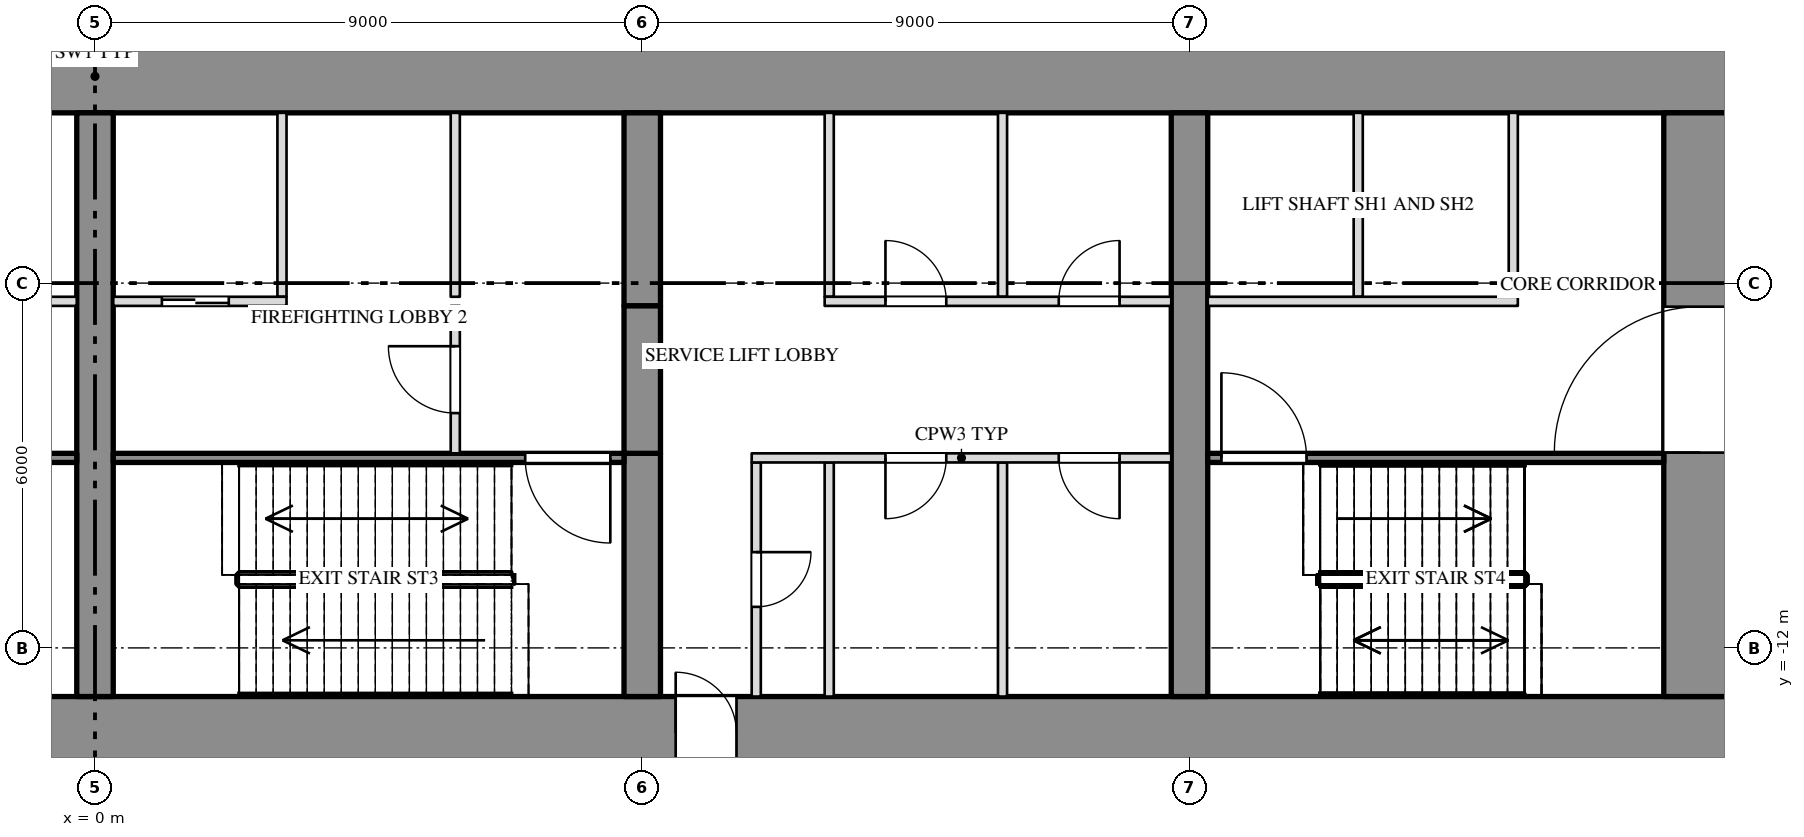
"""IFC4 building model, lengths in metres.
Left out: names, types, materials, properties, quantities, classifications, styles, units other than length and angle.
Written with IfcOpenShell. Run it as: python <this file> out.ifc"""

import sys

from ifc_helpers import new_model, si_unit, direction, frame, frame_2d, origin, place, context, subcontext, project, spatial, rectangle, extrude, element, fill, save


model = new_model("IFC4")
c1 = context("Model", 3, precision=1e-05, world=origin(), true_north=direction((0.0, 1.0)))
c2 = subcontext(c1, "Body", "Model", "MODEL_VIEW")
j1 = project(units=[si_unit("LENGTHUNIT", "METRE"), si_unit("PLANEANGLEUNIT", "RADIAN")], contexts=[c1])
p1 = place(None, origin())
s1 = spatial("IfcSite", under=j1, at=p1, CompositionType="ELEMENT")
p2 = place(p1, origin())
s2 = spatial("IfcBuilding", under=s1, at=p2, CompositionType="ELEMENT")
p3 = place(p2, frame((0.0, 0.0, 21.0)))
s3 = spatial("IfcBuildingStorey", under=s2, at=p3, CompositionType="ELEMENT", Elevation=21.0)
p4 = place(p3, frame((-27.0, -2.6, 0.0), z_axis=(0.0, 0.0, 1.0), x_axis=(1.0, 0.0, 0.0)))
e1 = element("IfcWall", 1, at=p4, inside=s3, PredefinedType="SHEAR", context=c2, shape_type="SweptSolid", body=[
    extrude(rectangle(XDim=54.0, YDim=1.2, at=frame_2d((27.0, 0.0))), origin(), (0.0, 0.0, 1.0), 5.7),
])
p5 = place(p3, frame((-27.0, -13.4, 0.0), z_axis=(0.0, 0.0, 1.0), x_axis=(1.0, 0.0, 0.0)))
e2 = element("IfcWall", 2, at=p5, inside=s3, PredefinedType="SHEAR", context=c2, shape_type="SweptSolid", body=[
    extrude(rectangle(XDim=54.0, YDim=1.2, at=frame_2d((27.0, 0.0))), origin(), (0.0, 0.0, 1.0), 5.7),
])
p6 = place(p5, frame((16.45, 0.0, 0.0)))
e3 = element("IfcOpeningElement", 3, at=p6, cuts=e2, PredefinedType="OPENING", context=c2, shape_type="SweptSolid", body=[
    extrude(rectangle(XDim=1.0, YDim=2.1, at=frame_2d((0.5, 1.05))), frame((0.0, 0.612, 0.0), z_axis=(0.0, -1.0, 0.0), x_axis=(1.0, 0.0, 0.0)), (0.0, 0.0, 1.0), 1.224),
])
p7 = place(p5, frame((36.55, 0.0, 0.0)))
e4 = element("IfcOpeningElement", 4, at=p7, cuts=e2, PredefinedType="OPENING", context=c2, shape_type="SweptSolid", body=[
    extrude(rectangle(XDim=1.0, YDim=2.1, at=frame_2d((0.5, 1.05))), frame((0.0, 0.612, 0.0), z_axis=(0.0, -1.0, 0.0), x_axis=(1.0, 0.0, 0.0)), (0.0, 0.0, 1.0), 1.224),
])
p8 = place(p3, frame((26.4, -12.8, 0.0), z_axis=(0.0, 0.0, 1.0), x_axis=(0.0, 1.0, 0.0)))
e5 = element("IfcWall", 5, at=p8, inside=s3, PredefinedType="SHEAR", context=c2, shape_type="SweptSolid", body=[
    extrude(rectangle(XDim=9.6, YDim=1.2, at=frame_2d((4.8, 0.0))), origin(), (0.0, 0.0, 1.0), 5.7),
])
p9 = place(p8, frame((4.012, 0.0, 0.0)))
e6 = element("IfcOpeningElement", 6, at=p9, cuts=e5, PredefinedType="OPENING", context=c2, shape_type="SweptSolid", body=[
    extrude(rectangle(XDim=2.4, YDim=2.1, at=frame_2d((1.2, 1.05))), frame((0.0, 0.612, 0.0), z_axis=(0.0, -1.0, 0.0), x_axis=(1.0, 0.0, 0.0)), (0.0, 0.0, 1.0), 1.224),
])
p10 = place(p3, frame((0.0, -12.8, 0.0), z_axis=(0.0, 0.0, 1.0), x_axis=(0.0, 1.0, 0.0)))
e7 = element("IfcWall", 7, at=p10, inside=s3, PredefinedType="SHEAR", context=c2, shape_type="SweptSolid", body=[
    extrude(rectangle(XDim=9.6, YDim=0.6, at=frame_2d((4.8, 0.0))), origin(), (0.0, 0.0, 1.0), 5.7),
])
p11 = place(p3, frame((9.0, -12.8, 0.0), z_axis=(0.0, 0.0, 1.0), x_axis=(0.0, 1.0, 0.0)))
e8 = element("IfcWall", 8, at=p11, inside=s3, PredefinedType="SHEAR", context=c2, shape_type="SweptSolid", body=[
    extrude(rectangle(XDim=4.0, YDim=0.6, at=frame_2d((2.0, 0.0))), origin(), (0.0, 0.0, 1.0), 5.7),
])
p12 = place(p3, frame((9.0, -6.375, 0.0), z_axis=(0.0, 0.0, 1.0), x_axis=(0.0, 1.0, 0.0)))
e9 = element("IfcWall", 9, at=p12, inside=s3, PredefinedType="SHEAR", context=c2, shape_type="SweptSolid", body=[
    extrude(rectangle(XDim=3.175, YDim=0.6, at=frame_2d((1.587, 0.0))), origin(), (0.0, 0.0, 1.0), 5.7),
])
p13 = place(p3, frame((9.0, -8.8, 3.6), z_axis=(0.0, 0.0, 1.0), x_axis=(0.0, 1.0, 0.0)))
e10 = element("IfcWall", 10, at=p13, inside=s3, PredefinedType="SHEAR", context=c2, shape_type="SweptSolid", body=[
    extrude(rectangle(XDim=2.425, YDim=0.6, at=frame_2d((1.212, 0.0))), origin(), (0.0, 0.0, 1.0), 2.1),
])
p14 = place(p3, frame((18.0, -12.8, 0.0), z_axis=(0.0, 0.0, 1.0), x_axis=(0.0, 1.0, 0.0)))
e11 = element("IfcWall", 11, at=p14, inside=s3, PredefinedType="SHEAR", context=c2, shape_type="SweptSolid", body=[
    extrude(rectangle(XDim=9.6, YDim=0.6, at=frame_2d((4.8, 0.0))), origin(), (0.0, 0.0, 1.0), 5.7),
])
for number, where, z_axis, x_axis in (
    (12, (3.075, -6.225, 0.0), (0.0, 0.0, 1.0), (0.0, 1.0, 0.0)),
    (13, (5.925, -6.225, 0.0), (0.0, 0.0, 1.0), (0.0, 1.0, 0.0)),
    (14, (12.075, -6.225, 0.0), (0.0, 0.0, 1.0), (0.0, 1.0, 0.0)),
    (15, (14.925, -6.225, 0.0), (0.0, 0.0, 1.0), (0.0, 1.0, 0.0)),
    (16, (20.775, -6.225, 0.0), (0.0, 0.0, 1.0), (0.0, 1.0, 0.0)),
    (17, (23.325, -6.225, 0.0), (0.0, 0.0, 1.0), (0.0, 1.0, 0.0)),
):
    element("IfcWall", number, at=place(p3, frame(where, z_axis=z_axis, x_axis=x_axis)), inside=s3, PredefinedType="PARTITIONING", context=c2, shape_type="SweptSolid", body=[
        extrude(rectangle(XDim=3.025, YDim=0.15, at=frame_2d((1.513, 0.0))), origin(), (0.0, 0.0, 1.0), 5.7),
    ])
p15 = place(p3, frame((10.875, -12.8, 0.0), z_axis=(0.0, 0.0, 1.0), x_axis=(0.0, 1.0, 0.0)))
e18 = element("IfcWall", 18, at=p15, inside=s3, PredefinedType="PARTITIONING", context=c2, shape_type="SweptSolid", body=[
    extrude(rectangle(XDim=3.85, YDim=0.15, at=frame_2d((1.925, 0.0))), origin(), (0.0, 0.0, 1.0), 5.7),
])
p16 = place(p15, frame((1.475, 0.0, 0.0)))
e19 = element("IfcOpeningElement", 19, at=p16, cuts=e18, PredefinedType="OPENING", context=c2, shape_type="SweptSolid", body=[
    extrude(rectangle(XDim=0.9, YDim=2.1, at=frame_2d((0.45, 1.05))), frame((0.0, 0.087, 0.0), z_axis=(0.0, -1.0, 0.0), x_axis=(1.0, 0.0, 0.0)), (0.0, 0.0, 1.0), 0.174),
])
for number, where, z_axis, x_axis in (
    (20, (12.075, -12.8, 0.0), (0.0, 0.0, 1.0), (0.0, 1.0, 0.0)),
    (21, (14.925, -12.8, 0.0), (0.0, 0.0, 1.0), (0.0, 1.0, 0.0)),
):
    element("IfcWall", number, at=place(p3, frame(where, z_axis=z_axis, x_axis=x_axis)), inside=s3, PredefinedType="PARTITIONING", context=c2, shape_type="SweptSolid", body=[
        extrude(rectangle(XDim=3.85, YDim=0.15, at=frame_2d((1.925, 0.0))), origin(), (0.0, 0.0, 1.0), 5.7),
    ])
p17 = place(p3, frame((5.925, -8.8, 0.0), z_axis=(0.0, 0.0, 1.0), x_axis=(0.0, 1.0, 0.0)))
e22 = element("IfcWall", 22, at=p17, inside=s3, PredefinedType="PARTITIONING", context=c2, shape_type="SweptSolid", body=[
    extrude(rectangle(XDim=2.425, YDim=0.15, at=frame_2d((1.212, 0.0))), origin(), (0.0, 0.0, 1.0), 5.7),
])
p18 = place(p17, frame((0.662, 0.0, 0.0)))
e23 = element("IfcOpeningElement", 23, at=p18, cuts=e22, PredefinedType="OPENING", context=c2, shape_type="SweptSolid", body=[
    extrude(rectangle(XDim=1.1, YDim=2.1, at=frame_2d((0.55, 1.05))), frame((0.0, 0.087, 0.0), z_axis=(0.0, -1.0, 0.0), x_axis=(1.0, 0.0, 0.0)), (0.0, 0.0, 1.0), 0.174),
])
p19 = place(p3, frame((-3.15, -6.3, 0.0), z_axis=(0.0, 0.0, 1.0), x_axis=(1.0, 0.0, 0.0)))
e24 = element("IfcWall", 24, at=p19, inside=s3, PredefinedType="PARTITIONING", context=c2, shape_type="SweptSolid", body=[
    extrude(rectangle(XDim=2.85, YDim=0.15, at=frame_2d((1.425, 0.0))), origin(), (0.0, 0.0, 1.0), 5.7),
])
p20 = place(p19, frame((0.95, 0.0, 0.0)))
e25 = element("IfcOpeningElement", 25, at=p20, cuts=e24, PredefinedType="OPENING", context=c2, shape_type="SweptSolid", body=[
    extrude(rectangle(XDim=1.1, YDim=2.1, at=frame_2d((0.55, 1.05))), frame((0.0, 0.087, 0.0), z_axis=(0.0, -1.0, 0.0), x_axis=(1.0, 0.0, 0.0)), (0.0, 0.0, 1.0), 0.174),
])
p21 = place(p3, frame((0.3, -6.3, 0.0), z_axis=(0.0, 0.0, 1.0), x_axis=(1.0, 0.0, 0.0)))
e26 = element("IfcWall", 26, at=p21, inside=s3, PredefinedType="PARTITIONING", context=c2, shape_type="SweptSolid", body=[
    extrude(rectangle(XDim=2.85, YDim=0.15, at=frame_2d((1.425, 0.0))), origin(), (0.0, 0.0, 1.0), 5.7),
])
p22 = place(p21, frame((0.8, 0.0, 0.0)))
e27 = element("IfcOpeningElement", 27, at=p22, cuts=e26, PredefinedType="OPENING", context=c2, shape_type="SweptSolid", body=[
    extrude(rectangle(XDim=1.1, YDim=2.1, at=frame_2d((0.55, 1.05))), frame((0.0, 0.087, 0.0), z_axis=(0.0, -1.0, 0.0), x_axis=(1.0, 0.0, 0.0)), (0.0, 0.0, 1.0), 0.174),
])
p23 = place(p3, frame((12.0, -6.3, 0.0), z_axis=(0.0, 0.0, 1.0), x_axis=(1.0, 0.0, 0.0)))
e28 = element("IfcWall", 28, at=p23, inside=s3, PredefinedType="PARTITIONING", context=c2, shape_type="SweptSolid", body=[
    extrude(rectangle(XDim=5.7, YDim=0.15, at=frame_2d((2.85, 0.0))), origin(), (0.0, 0.0, 1.0), 5.7),
])
p24 = place(p23, frame((1.0, 0.0, 0.0)))
e29 = element("IfcOpeningElement", 29, at=p24, cuts=e28, PredefinedType="OPENING", context=c2, shape_type="SweptSolid", body=[
    extrude(rectangle(XDim=1.0, YDim=2.1, at=frame_2d((0.5, 1.05))), frame((0.0, 0.087, 0.0), z_axis=(0.0, -1.0, 0.0), x_axis=(1.0, 0.0, 0.0)), (0.0, 0.0, 1.0), 0.174),
])
p25 = place(p23, frame((3.85, 0.0, 0.0)))
e30 = element("IfcOpeningElement", 30, at=p25, cuts=e28, PredefinedType="OPENING", context=c2, shape_type="SweptSolid", body=[
    extrude(rectangle(XDim=1.0, YDim=2.1, at=frame_2d((0.5, 1.05))), frame((0.0, 0.087, 0.0), z_axis=(0.0, -1.0, 0.0), x_axis=(1.0, 0.0, 0.0)), (0.0, 0.0, 1.0), 0.174),
])
p26 = place(p3, frame((18.3, -6.3, 0.0), z_axis=(0.0, 0.0, 1.0), x_axis=(1.0, 0.0, 0.0)))
e31 = element("IfcWall", 31, at=p26, inside=s3, PredefinedType="PARTITIONING", context=c2, shape_type="SweptSolid", body=[
    extrude(rectangle(XDim=5.1, YDim=0.15, at=frame_2d((2.55, 0.0))), origin(), (0.0, 0.0, 1.0), 5.7),
])
p27 = place(p3, frame((-8.7, -8.875, 0.0), z_axis=(0.0, 0.0, 1.0), x_axis=(1.0, 0.0, 0.0)))
e32 = element("IfcWall", 32, at=p27, inside=s3, PredefinedType="SHEAR", context=c2, shape_type="SweptSolid", body=[
    extrude(rectangle(XDim=8.4, YDim=0.15, at=frame_2d((4.2, 0.0))), origin(), (0.0, 0.0, 1.0), 5.7),
])
p28 = place(p27, frame((0.225, 0.0, 0.0)))
e33 = element("IfcOpeningElement", 33, at=p28, cuts=e32, PredefinedType="OPENING", context=c2, shape_type="SweptSolid", body=[
    extrude(rectangle(XDim=1.4, YDim=2.1, at=frame_2d((0.7, 1.05))), frame((0.0, 0.087, 0.0), z_axis=(0.0, -1.0, 0.0), x_axis=(1.0, 0.0, 0.0)), (0.0, 0.0, 1.0), 0.174),
])
p29 = place(p3, frame((0.3, -8.875, 0.0), z_axis=(0.0, 0.0, 1.0), x_axis=(1.0, 0.0, 0.0)))
e34 = element("IfcWall", 34, at=p29, inside=s3, PredefinedType="SHEAR", context=c2, shape_type="SweptSolid", body=[
    extrude(rectangle(XDim=8.4, YDim=0.15, at=frame_2d((4.2, 0.0))), origin(), (0.0, 0.0, 1.0), 5.7),
])
p30 = place(p29, frame((6.775, 0.0, 0.0)))
e35 = element("IfcOpeningElement", 35, at=p30, cuts=e34, PredefinedType="OPENING", context=c2, shape_type="SweptSolid", body=[
    extrude(rectangle(XDim=1.4, YDim=2.1, at=frame_2d((0.7, 1.05))), frame((0.0, 0.087, 0.0), z_axis=(0.0, -1.0, 0.0), x_axis=(1.0, 0.0, 0.0)), (0.0, 0.0, 1.0), 0.174),
])
p31 = place(p3, frame((10.8, -8.875, 0.0), z_axis=(0.0, 0.0, 1.0), x_axis=(1.0, 0.0, 0.0)))
e36 = element("IfcWall", 36, at=p31, inside=s3, PredefinedType="PARTITIONING", context=c2, shape_type="SweptSolid", body=[
    extrude(rectangle(XDim=6.9, YDim=0.15, at=frame_2d((3.45, 0.0))), origin(), (0.0, 0.0, 1.0), 5.7),
])
p32 = place(p31, frame((2.2, 0.0, 0.0)))
e37 = element("IfcOpeningElement", 37, at=p32, cuts=e36, PredefinedType="OPENING", context=c2, shape_type="SweptSolid", body=[
    extrude(rectangle(XDim=1.0, YDim=2.1, at=frame_2d((0.5, 1.05))), frame((0.0, 0.087, 0.0), z_axis=(0.0, -1.0, 0.0), x_axis=(1.0, 0.0, 0.0)), (0.0, 0.0, 1.0), 0.174),
])
p33 = place(p31, frame((5.05, 0.0, 0.0)))
e38 = element("IfcOpeningElement", 38, at=p33, cuts=e36, PredefinedType="OPENING", context=c2, shape_type="SweptSolid", body=[
    extrude(rectangle(XDim=1.0, YDim=2.1, at=frame_2d((0.5, 1.05))), frame((0.0, 0.087, 0.0), z_axis=(0.0, -1.0, 0.0), x_axis=(1.0, 0.0, 0.0)), (0.0, 0.0, 1.0), 0.174),
])
p34 = place(p3, frame((18.3, -8.875, 0.0), z_axis=(0.0, 0.0, 1.0), x_axis=(1.0, 0.0, 0.0)))
e39 = element("IfcWall", 39, at=p34, inside=s3, PredefinedType="SHEAR", context=c2, shape_type="SweptSolid", body=[
    extrude(rectangle(XDim=7.5, YDim=0.15, at=frame_2d((3.75, 0.0))), origin(), (0.0, 0.0, 1.0), 5.7),
])
p35 = place(p34, frame((0.225, 0.0, 0.0)))
e40 = element("IfcOpeningElement", 40, at=p35, cuts=e39, PredefinedType="OPENING", context=c2, shape_type="SweptSolid", body=[
    extrude(rectangle(XDim=1.4, YDim=2.1, at=frame_2d((0.7, 1.05))), frame((0.0, 0.087, 0.0), z_axis=(0.0, -1.0, 0.0), x_axis=(1.0, 0.0, 0.0)), (0.0, 0.0, 1.0), 0.174),
])
p36 = place(p22, origin())
e41 = element("IfcDoor", 41, at=p36, inside=s3, OperationType="SLIDING_TO_RIGHT", PredefinedType="DOOR", context=c2, shape_type="SweptSolid", body=[
    extrude(rectangle(XDim=1.1, YDim=2.1, at=frame_2d((0.55, 1.05))), frame((0.0, 0.025, 0.0), z_axis=(0.0, -1.0, 0.0), x_axis=(1.0, 0.0, 0.0)), (0.0, 0.0, 1.0), 0.05),
])
fill(e27, e41)
p37 = place(p18, origin())
e42 = element("IfcDoor", 42, at=p37, inside=s3, OperationType="SINGLE_SWING_RIGHT", PredefinedType="DOOR", context=c2, shape_type="SweptSolid", body=[
    extrude(rectangle(XDim=1.1, YDim=2.1, at=frame_2d((0.55, 1.05))), frame((0.0, 0.025, 0.0), z_axis=(0.0, -1.0, 0.0), x_axis=(1.0, 0.0, 0.0)), (0.0, 0.0, 1.0), 0.05),
])
fill(e23, e42)
p38 = place(p30, origin())
e43 = element("IfcDoor", 43, at=p38, inside=s3, OperationType="DOUBLE_DOOR_SINGLE_SWING", PredefinedType="DOOR", context=c2, shape_type="SweptSolid", body=[
    extrude(rectangle(XDim=1.4, YDim=2.1, at=frame_2d((0.7, 1.05))), frame((0.0, 0.025, 0.0), z_axis=(0.0, -1.0, 0.0), x_axis=(1.0, 0.0, 0.0)), (0.0, 0.0, 1.0), 0.05),
])
fill(e35, e43)
p39 = place(p7, origin())
e44 = element("IfcDoor", 44, at=p39, inside=s3, OperationType="SINGLE_SWING_LEFT", PredefinedType="DOOR", context=c2, shape_type="SweptSolid", body=[
    extrude(rectangle(XDim=1.0, YDim=2.1, at=frame_2d((0.5, 1.05))), frame((0.0, 0.025, 0.0), z_axis=(0.0, -1.0, 0.0), x_axis=(1.0, 0.0, 0.0)), (0.0, 0.0, 1.0), 0.05),
])
fill(e4, e44)
p40 = place(p16, origin())
e45 = element("IfcDoor", 45, at=p40, inside=s3, OperationType="SINGLE_SWING_LEFT", PredefinedType="DOOR", context=c2, shape_type="SweptSolid", body=[
    extrude(rectangle(XDim=0.9, YDim=2.1, at=frame_2d((0.45, 1.05))), frame((0.0, 0.025, 0.0), z_axis=(0.0, -1.0, 0.0), x_axis=(1.0, 0.0, 0.0)), (0.0, 0.0, 1.0), 0.05),
])
fill(e19, e45)
p41 = place(p32, origin())
e46 = element("IfcDoor", 46, at=p41, inside=s3, OperationType="SINGLE_SWING_RIGHT", PredefinedType="DOOR", context=c2, shape_type="SweptSolid", body=[
    extrude(rectangle(XDim=1.0, YDim=2.1, at=frame_2d((0.5, 1.05))), frame((0.0, 0.025, 0.0), z_axis=(0.0, -1.0, 0.0), x_axis=(1.0, 0.0, 0.0)), (0.0, 0.0, 1.0), 0.05),
])
fill(e37, e46)
p42 = place(p24, origin())
e47 = element("IfcDoor", 47, at=p42, inside=s3, OperationType="SINGLE_SWING_LEFT", PredefinedType="DOOR", context=c2, shape_type="SweptSolid", body=[
    extrude(rectangle(XDim=1.0, YDim=2.1, at=frame_2d((0.5, 1.05))), frame((0.0, 0.025, 0.0), z_axis=(0.0, -1.0, 0.0), x_axis=(1.0, 0.0, 0.0)), (0.0, 0.0, 1.0), 0.05),
])
fill(e29, e47)
p43 = place(p33, origin())
e48 = element("IfcDoor", 48, at=p43, inside=s3, OperationType="SINGLE_SWING_LEFT", PredefinedType="DOOR", context=c2, shape_type="SweptSolid", body=[
    extrude(rectangle(XDim=1.0, YDim=2.1, at=frame_2d((0.5, 1.05))), frame((0.0, 0.025, 0.0), z_axis=(0.0, -1.0, 0.0), x_axis=(1.0, 0.0, 0.0)), (0.0, 0.0, 1.0), 0.05),
])
fill(e38, e48)
p44 = place(p25, origin())
e49 = element("IfcDoor", 49, at=p44, inside=s3, OperationType="SINGLE_SWING_RIGHT", PredefinedType="DOOR", context=c2, shape_type="SweptSolid", body=[
    extrude(rectangle(XDim=1.0, YDim=2.1, at=frame_2d((0.5, 1.05))), frame((0.0, 0.025, 0.0), z_axis=(0.0, -1.0, 0.0), x_axis=(1.0, 0.0, 0.0)), (0.0, 0.0, 1.0), 0.05),
])
fill(e30, e49)
p45 = place(p35, origin())
e50 = element("IfcDoor", 50, at=p45, inside=s3, OperationType="DOUBLE_DOOR_SINGLE_SWING", PredefinedType="DOOR", context=c2, shape_type="SweptSolid", body=[
    extrude(rectangle(XDim=1.4, YDim=2.1, at=frame_2d((0.7, 1.05))), frame((0.0, 0.025, 0.0), z_axis=(0.0, -1.0, 0.0), x_axis=(1.0, 0.0, 0.0)), (0.0, 0.0, 1.0), 0.05),
])
fill(e40, e50)
p46 = place(p9, origin())
e51 = element("IfcDoor", 51, at=p46, inside=s3, OperationType="DOUBLE_DOOR_SINGLE_SWING", PredefinedType="DOOR", context=c2, shape_type="SweptSolid", body=[
    extrude(rectangle(XDim=2.4, YDim=2.1, at=frame_2d((1.2, 1.05))), frame((0.0, 0.025, 0.0), z_axis=(0.0, -1.0, 0.0), x_axis=(1.0, 0.0, 0.0)), (0.0, 0.0, 1.0), 0.05),
])
fill(e6, e51)
save(model, sys.argv[1])
